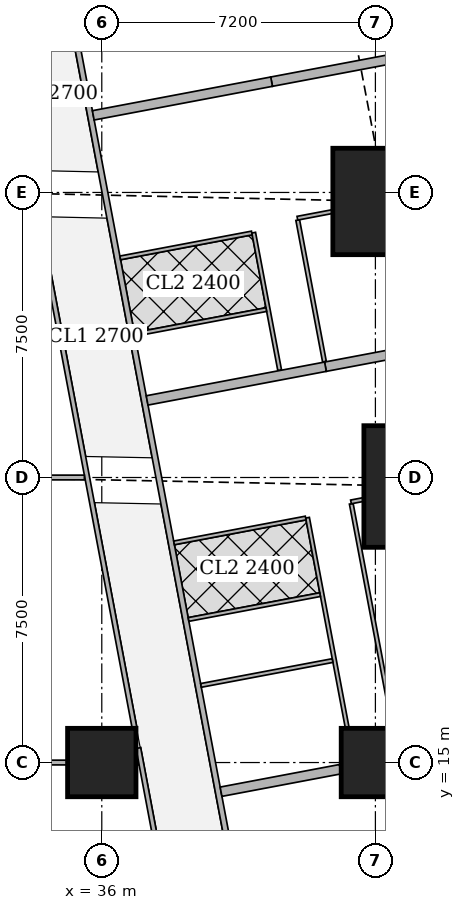
"""IFC4 building model, lengths in metres.
Left out: names, types, materials, properties, quantities, classifications, styles, units other than length and angle.
Written with IfcOpenShell. Run it as: python <this file> out.ifc"""

import sys

from ifc_helpers import new_model, si_unit, direction, frame, frame_2d, origin, origin_2d, place, context, subcontext, project, spatial, rectangle, extrude, element, fill, save


model = new_model("IFC4")
c1 = context("Model", 3, precision=1e-05, world=origin(), true_north=direction((0.0, 1.0)))
c2 = subcontext(c1, "Body", "Model", "MODEL_VIEW")
j1 = project(units=[si_unit("LENGTHUNIT", "METRE"), si_unit("PLANEANGLEUNIT", "RADIAN")], contexts=[c1])
p1 = place(None, origin())
s1 = spatial("IfcSite", under=j1, at=p1, CompositionType="ELEMENT")
p2 = place(p1, origin())
s2 = spatial("IfcBuilding", under=s1, at=p2, CompositionType="ELEMENT")
p3 = place(p2, frame((0.0, 0.0, 42.5)))
s3 = spatial("IfcBuildingStorey", under=s2, at=p3, CompositionType="ELEMENT", Elevation=42.5)
for number, where, z_axis, x_axis in (
    (1, (36.0, 15.0, 0.0), (0.0, 0.0, 1.0), (1.0, 0.0, 0.0)),
    (2, (43.2, 15.0, 0.0), (0.0, 0.0, 1.0), (1.0, 0.0, 0.0)),
):
    element("IfcColumn", number, at=place(p3, frame(where, z_axis=z_axis, x_axis=x_axis)), inside=s3, PredefinedType="COLUMN", context=c2, shape_type="SweptSolid", body=[
        extrude(rectangle(XDim=1.8, YDim=1.8, at=origin_2d()), origin(), (0.0, 0.0, 1.0), 3.75),
    ])
p4 = place(p3, frame((44.697, 22.263, 0.0), z_axis=(0.0, 0.0, 1.0), x_axis=(1.0, 0.0, 0.0)))
e3 = element("IfcColumn", 3, at=p4, inside=s3, PredefinedType="COLUMN", context=c2, shape_type="SweptSolid", body=[
    extrude(rectangle(XDim=3.6, YDim=3.2, at=origin_2d()), origin(), (0.0, 0.0, 1.0), 3.75),
])
p5 = place(p3, frame((43.48, 29.763, 0.0), z_axis=(0.0, 0.0, 1.0), x_axis=(1.0, 0.0, 0.0)))
e4 = element("IfcColumn", 4, at=p5, inside=s3, PredefinedType="COLUMN", context=c2, shape_type="SweptSolid", body=[
    extrude(rectangle(XDim=2.8, YDim=2.8, at=origin_2d()), origin(), (0.0, 0.0, 1.0), 3.75),
])
p6 = place(p3, frame((50.653, 2.703, 0.0), z_axis=(0.0, 0.0, 1.0), x_axis=(-0.185612026696, 0.982623109613, 0.0)))
e5 = element("IfcWall", 5, at=p6, inside=s3, PredefinedType="SOLIDWALL", context=c2, shape_type="SweptSolid", body=[
    extrude(rectangle(XDim=41.393, YDim=0.2, at=frame_2d((20.697, 0.0))), origin(), (0.0, 0.0, 1.0), 3.5),
])
p7 = place(p6, frame((1.633, 0.0, 0.9)))
e6 = element("IfcOpeningElement", 6, at=p7, cuts=e5, PredefinedType="OPENING", context=c2, shape_type="SweptSolid", body=[
    extrude(rectangle(XDim=1.8, YDim=1.5, at=frame_2d((0.9, 0.75))), frame((0.0, 0.11, 0.0), z_axis=(0.0, -1.0, 0.0), x_axis=(1.0, 0.0, 0.0)), (0.0, 0.0, 1.0), 0.22),
])
p8 = place(p6, frame((6.032, 0.0, 0.9)))
e7 = element("IfcOpeningElement", 7, at=p8, cuts=e5, PredefinedType="OPENING", context=c2, shape_type="SweptSolid", body=[
    extrude(rectangle(XDim=1.8, YDim=1.5, at=frame_2d((0.9, 0.75))), frame((0.0, 0.11, 0.0), z_axis=(0.0, -1.0, 0.0), x_axis=(1.0, 0.0, 0.0)), (0.0, 0.0, 1.0), 0.22),
])
p9 = place(p6, frame((9.848, 0.0, 0.9)))
e8 = element("IfcOpeningElement", 8, at=p9, cuts=e5, PredefinedType="OPENING", context=c2, shape_type="SweptSolid", body=[
    extrude(rectangle(XDim=1.8, YDim=1.5, at=frame_2d((0.9, 0.75))), frame((0.0, 0.11, 0.0), z_axis=(0.0, -1.0, 0.0), x_axis=(1.0, 0.0, 0.0)), (0.0, 0.0, 1.0), 0.22),
])
p10 = place(p6, frame((17.481, 0.0, 0.9)))
e9 = element("IfcOpeningElement", 9, at=p10, cuts=e5, PredefinedType="OPENING", context=c2, shape_type="SweptSolid", body=[
    extrude(rectangle(XDim=1.8, YDim=1.5, at=frame_2d((0.9, 0.75))), frame((0.0, 0.11, 0.0), z_axis=(0.0, -1.0, 0.0), x_axis=(1.0, 0.0, 0.0)), (0.0, 0.0, 1.0), 0.22),
])
p11 = place(p6, frame((21.297, 0.0, 0.9)))
e10 = element("IfcOpeningElement", 10, at=p11, cuts=e5, PredefinedType="OPENING", context=c2, shape_type="SweptSolid", body=[
    extrude(rectangle(XDim=1.8, YDim=1.5, at=frame_2d((0.9, 0.75))), frame((0.0, 0.11, 0.0), z_axis=(0.0, -1.0, 0.0), x_axis=(1.0, 0.0, 0.0)), (0.0, 0.0, 1.0), 0.22),
])
p12 = place(p6, frame((25.113, 0.0, 0.9)))
e11 = element("IfcOpeningElement", 11, at=p12, cuts=e5, PredefinedType="OPENING", context=c2, shape_type="SweptSolid", body=[
    extrude(rectangle(XDim=1.8, YDim=1.5, at=frame_2d((0.9, 0.75))), frame((0.0, 0.11, 0.0), z_axis=(0.0, -1.0, 0.0), x_axis=(1.0, 0.0, 0.0)), (0.0, 0.0, 1.0), 0.22),
])
p13 = place(p6, frame((28.93, 0.0, 0.9)))
e12 = element("IfcOpeningElement", 12, at=p13, cuts=e5, PredefinedType="OPENING", context=c2, shape_type="SweptSolid", body=[
    extrude(rectangle(XDim=1.8, YDim=1.5, at=frame_2d((0.9, 0.75))), frame((0.0, 0.11, 0.0), z_axis=(0.0, -1.0, 0.0), x_axis=(1.0, 0.0, 0.0)), (0.0, 0.0, 1.0), 0.22),
])
p14 = place(p6, frame((32.746, 0.0, 0.9)))
e13 = element("IfcOpeningElement", 13, at=p14, cuts=e5, PredefinedType="OPENING", context=c2, shape_type="SweptSolid", body=[
    extrude(rectangle(XDim=1.8, YDim=1.5, at=frame_2d((0.9, 0.75))), frame((0.0, 0.11, 0.0), z_axis=(0.0, -1.0, 0.0), x_axis=(1.0, 0.0, 0.0)), (0.0, 0.0, 1.0), 0.22),
])
p15 = place(p6, frame((36.481, 0.0, 0.9)))
e14 = element("IfcOpeningElement", 14, at=p15, cuts=e5, PredefinedType="OPENING", context=c2, shape_type="SweptSolid", body=[
    extrude(rectangle(XDim=1.8, YDim=1.5, at=frame_2d((0.9, 0.75))), frame((0.0, 0.11, 0.0), z_axis=(0.0, -1.0, 0.0), x_axis=(1.0, 0.0, 0.0)), (0.0, 0.0, 1.0), 0.22),
])
p16 = place(p3, frame((33.68, 42.723, 0.0), z_axis=(0.0, 0.0, 1.0), x_axis=(0.185624129307, -0.98262082342, 0.0)))
e15 = element("IfcWall", 15, at=p16, inside=s3, PredefinedType="SOLIDWALL", context=c2, shape_type="SweptSolid", body=[
    extrude(rectangle(XDim=41.051, YDim=0.15, at=frame_2d((20.526, 0.0))), origin(), (0.0, 0.0, 1.0), 2.5),
])
p17 = place(p16, frame((7.73, 0.0, 0.0)))
e16 = element("IfcOpeningElement", 16, at=p17, cuts=e15, PredefinedType="OPENING", context=c2, shape_type="SweptSolid", body=[
    extrude(rectangle(XDim=1.0, YDim=2.1, at=frame_2d((0.5, 1.05))), frame((0.0, 0.085, 0.0), z_axis=(0.0, -1.0, 0.0), x_axis=(1.0, 0.0, 0.0)), (0.0, 0.0, 1.0), 0.17),
])
p18 = place(p16, frame((12.307, 0.0, 0.0)))
e17 = element("IfcOpeningElement", 17, at=p18, cuts=e15, PredefinedType="OPENING", context=c2, shape_type="SweptSolid", body=[
    extrude(rectangle(XDim=1.0, YDim=2.1, at=frame_2d((0.5, 1.05))), frame((0.0, 0.085, 0.0), z_axis=(0.0, -1.0, 0.0), x_axis=(1.0, 0.0, 0.0)), (0.0, 0.0, 1.0), 0.17),
])
p19 = place(p16, frame((19.938, 0.0, 0.0)))
e18 = element("IfcOpeningElement", 18, at=p19, cuts=e15, PredefinedType="OPENING", context=c2, shape_type="SweptSolid", body=[
    extrude(rectangle(XDim=1.0, YDim=2.1, at=frame_2d((0.5, 1.05))), frame((0.0, 0.085, 0.0), z_axis=(0.0, -1.0, 0.0), x_axis=(1.0, 0.0, 0.0)), (0.0, 0.0, 1.0), 0.17),
])
p20 = place(p16, frame((32.193, 0.0, 0.0)))
e19 = element("IfcOpeningElement", 19, at=p20, cuts=e15, PredefinedType="OPENING", context=c2, shape_type="SweptSolid", body=[
    extrude(rectangle(XDim=1.0, YDim=2.1, at=frame_2d((0.5, 1.05))), frame((0.0, 0.085, 0.0), z_axis=(0.0, -1.0, 0.0), x_axis=(1.0, 0.0, 0.0)), (0.0, 0.0, 1.0), 0.17),
])
p21 = place(p3, frame((41.156, 29.273, 0.0), z_axis=(0.0, 0.0, 1.0), x_axis=(0.185474762472, -0.982649028131, 0.0)))
e20 = element("IfcWall", 20, at=p21, inside=s3, PredefinedType="PARTITIONING", context=c2, shape_type="SweptSolid", body=[
    extrude(rectangle(XDim=3.79, YDim=0.1, at=frame_2d((1.895, 0.0))), origin(), (0.0, 0.0, 1.0), 2.5),
])
p22 = place(p21, frame((1.2, 0.0, 0.0)))
e21 = element("IfcOpeningElement", 21, at=p22, cuts=e20, PredefinedType="OPENING", context=c2, shape_type="SweptSolid", body=[
    extrude(rectangle(XDim=0.9, YDim=2.1, at=frame_2d((0.45, 1.05))), frame((0.0, 0.06, 0.0), z_axis=(0.0, -1.0, 0.0), x_axis=(1.0, 0.0, 0.0)), (0.0, 0.0, 1.0), 0.12),
])
p23 = place(p3, frame((39.997, 28.942, 0.0), z_axis=(0.0, 0.0, 1.0), x_axis=(0.185580474845, -0.982629069057, 0.0)))
e22 = element("IfcWall", 22, at=p23, inside=s3, PredefinedType="PARTITIONING", context=c2, shape_type="SweptSolid", body=[
    extrude(rectangle(XDim=3.685, YDim=0.1, at=frame_2d((1.842, 0.0))), origin(), (0.0, 0.0, 1.0), 3.5),
])
p24 = place(p23, frame((0.576, 0.0, 0.0)))
e23 = element("IfcOpeningElement", 23, at=p24, cuts=e22, PredefinedType="OPENING", context=c2, shape_type="SweptSolid", body=[
    extrude(rectangle(XDim=0.9, YDim=2.1, at=frame_2d((0.45, 1.05))), frame((0.0, 0.06, 0.0), z_axis=(0.0, -1.0, 0.0), x_axis=(1.0, 0.0, 0.0)), (0.0, 0.0, 1.0), 0.12),
])
p25 = place(p23, frame((2.483, 0.0, 0.0)))
e24 = element("IfcOpeningElement", 24, at=p25, cuts=e22, PredefinedType="OPENING", context=c2, shape_type="SweptSolid", body=[
    extrude(rectangle(XDim=0.9, YDim=2.1, at=frame_2d((0.45, 1.05))), frame((0.0, 0.06, 0.0), z_axis=(0.0, -1.0, 0.0), x_axis=(1.0, 0.0, 0.0)), (0.0, 0.0, 1.0), 0.12),
])
p26 = place(p3, frame((42.07, 29.497, 0.0), z_axis=(0.0, 0.0, 1.0), x_axis=(-0.982490624992, -0.186312028067, 0.0)))
e25 = element("IfcWall", 25, at=p26, inside=s3, PredefinedType="PARTITIONING", context=c2, shape_type="SweptSolid", body=[
    extrude(rectangle(XDim=0.939, YDim=0.1, at=frame_2d((0.47, 0.0))), origin(), (0.0, 0.0, 1.0), 2.5),
])
p27 = place(p3, frame((39.948, 28.933, 0.0), z_axis=(0.0, 0.0, 1.0), x_axis=(-0.982576058723, -0.185860939478, 0.0)))
e26 = element("IfcWall", 26, at=p27, inside=s3, PredefinedType="PARTITIONING", context=c2, shape_type="SweptSolid", body=[
    extrude(rectangle(XDim=3.524, YDim=0.1, at=frame_2d((1.762, 0.0))), origin(), (0.0, 0.0, 1.0), 3.5),
])
p28 = place(p3, frame((40.329, 26.918, 0.0), z_axis=(0.0, 0.0, 1.0), x_axis=(-0.982638553676, -0.185530247748, 0.0)))
e27 = element("IfcWall", 27, at=p28, inside=s3, PredefinedType="PARTITIONING", context=c2, shape_type="SweptSolid", body=[
    extrude(rectangle(XDim=3.525, YDim=0.1, at=frame_2d((1.763, 0.0))), origin(), (0.0, 0.0, 1.0), 3.5),
])
p29 = place(p3, frame((44.693, 33.713, 0.0), z_axis=(0.0, 0.0, 1.0), x_axis=(-0.982633535512, -0.185556823879, 0.0)))
e28 = element("IfcWall", 28, at=p29, inside=s3, PredefinedType="SOLIDWALL", context=c2, shape_type="SweptSolid", body=[
    extrude(rectangle(XDim=4.3, YDim=0.25, at=frame_2d((2.15, 0.0))), origin(), (0.0, 0.0, 1.0), 2.05),
])
p30 = place(p3, frame((40.468, 32.915, 0.0), z_axis=(0.0, 0.0, 1.0), x_axis=(-0.982635807605, -0.185544791394, 0.0)))
e29 = element("IfcWall", 29, at=p30, inside=s3, PredefinedType="SOLIDWALL", context=c2, shape_type="SweptSolid", body=[
    extrude(rectangle(XDim=4.775, YDim=0.25, at=frame_2d((2.388, 0.0))), origin(), (0.0, 0.0, 1.0), 3.5),
])
p31 = place(p3, frame((42.565, 21.809, 0.0), z_axis=(0.0, 0.0, 1.0), x_axis=(0.185719768524, -0.982602751665, 0.0)))
e30 = element("IfcWall", 30, at=p31, inside=s3, PredefinedType="PARTITIONING", context=c2, shape_type="SweptSolid", body=[
    extrude(rectangle(XDim=6.004, YDim=0.1, at=frame_2d((3.002, 0.0))), origin(), (0.0, 0.0, 1.0), 2.5),
])
p32 = place(p31, frame((1.45, 0.0, 0.0)))
e31 = element("IfcOpeningElement", 31, at=p32, cuts=e30, PredefinedType="OPENING", context=c2, shape_type="SweptSolid", body=[
    extrude(rectangle(XDim=0.9, YDim=2.1, at=frame_2d((0.45, 1.05))), frame((0.0, 0.06, 0.0), z_axis=(0.0, -1.0, 0.0), x_axis=(1.0, 0.0, 0.0)), (0.0, 0.0, 1.0), 0.12),
])
p33 = place(p3, frame((41.414, 21.442, 0.0), z_axis=(0.0, 0.0, 1.0), x_axis=(0.185605379031, -0.982624365297, 0.0)))
e32 = element("IfcWall", 32, at=p33, inside=s3, PredefinedType="PARTITIONING", context=c2, shape_type="SweptSolid", body=[
    extrude(rectangle(XDim=5.63, YDim=0.1, at=frame_2d((2.815, 0.0))), origin(), (0.0, 0.0, 1.0), 3.5),
])
p34 = place(p33, frame((0.575, 0.0, 0.0)))
e33 = element("IfcOpeningElement", 33, at=p34, cuts=e32, PredefinedType="OPENING", context=c2, shape_type="SweptSolid", body=[
    extrude(rectangle(XDim=0.9, YDim=2.1, at=frame_2d((0.45, 1.05))), frame((0.0, 0.06, 0.0), z_axis=(0.0, -1.0, 0.0), x_axis=(1.0, 0.0, 0.0)), (0.0, 0.0, 1.0), 0.12),
])
p35 = place(p33, frame((4.58, 0.0, 0.0)))
e34 = element("IfcOpeningElement", 34, at=p35, cuts=e32, PredefinedType="OPENING", context=c2, shape_type="SweptSolid", body=[
    extrude(rectangle(XDim=0.9, YDim=2.1, at=frame_2d((0.45, 1.05))), frame((0.0, 0.06, 0.0), z_axis=(0.0, -1.0, 0.0), x_axis=(1.0, 0.0, 0.0)), (0.0, 0.0, 1.0), 0.12),
])
p36 = place(p33, frame((2.483, 0.0, 0.0)))
e35 = element("IfcOpeningElement", 35, at=p36, cuts=e32, PredefinedType="OPENING", context=c2, shape_type="SweptSolid", body=[
    extrude(rectangle(XDim=0.9, YDim=2.1, at=frame_2d((0.45, 1.05))), frame((0.0, 0.06, 0.0), z_axis=(0.0, -1.0, 0.0), x_axis=(1.0, 0.0, 0.0)), (0.0, 0.0, 1.0), 0.12),
])
p37 = place(p3, frame((42.887, 21.921, 0.0), z_axis=(0.0, 0.0, 1.0), x_axis=(-0.982274918032, -0.187445953293, 0.0)))
e36 = element("IfcWall", 36, at=p37, inside=s3, PredefinedType="PARTITIONING", context=c2, shape_type="SweptSolid", body=[
    extrude(rectangle(XDim=0.336, YDim=0.1, at=frame_2d((0.168, 0.0))), origin(), (0.0, 0.0, 1.0), 2.5),
])
p38 = place(p3, frame((41.365, 21.433, 0.0), z_axis=(0.0, 0.0, 1.0), x_axis=(-0.982638553676, -0.185530247748, 0.0)))
e37 = element("IfcWall", 37, at=p38, inside=s3, PredefinedType="PARTITIONING", context=c2, shape_type="SweptSolid", body=[
    extrude(rectangle(XDim=3.525, YDim=0.1, at=frame_2d((1.763, 0.0))), origin(), (0.0, 0.0, 1.0), 3.5),
])
p39 = place(p3, frame((42.073, 17.683, 0.0), z_axis=(0.0, 0.0, 1.0), x_axis=(-0.982626628545, -0.185593396635, 0.0)))
e38 = element("IfcWall", 38, at=p39, inside=s3, PredefinedType="PARTITIONING", context=c2, shape_type="SweptSolid", body=[
    extrude(rectangle(XDim=3.524, YDim=0.1, at=frame_2d((1.762, 0.0))), origin(), (0.0, 0.0, 1.0), 3.5),
])
p40 = place(p3, frame((41.745, 19.418, 0.0), z_axis=(0.0, 0.0, 1.0), x_axis=(-0.982629014545, -0.18558076348, 0.0)))
e39 = element("IfcWall", 39, at=p40, inside=s3, PredefinedType="PARTITIONING", context=c2, shape_type="SweptSolid", body=[
    extrude(rectangle(XDim=3.524, YDim=0.1, at=frame_2d((1.762, 0.0))), origin(), (0.0, 0.0, 1.0), 3.5),
])
p41 = place(p3, frame((46.11, 26.213, 0.0), z_axis=(0.0, 0.0, 1.0), x_axis=(-0.982633535512, -0.185556823879, 0.0)))
e40 = element("IfcWall", 40, at=p41, inside=s3, PredefinedType="SOLIDWALL", context=c2, shape_type="SweptSolid", body=[
    extrude(rectangle(XDim=4.3, YDim=0.25, at=frame_2d((2.15, 0.0))), origin(), (0.0, 0.0, 1.0), 2.05),
])
p42 = place(p3, frame((41.885, 25.415, 0.0), z_axis=(0.0, 0.0, 1.0), x_axis=(-0.982596737686, -0.185751584349, 0.0)))
e41 = element("IfcWall", 41, at=p42, inside=s3, PredefinedType="SOLIDWALL", context=c2, shape_type="SweptSolid", body=[
    extrude(rectangle(XDim=4.775, YDim=0.25, at=frame_2d((2.387, 0.0))), origin(), (0.0, 0.0, 1.0), 3.5),
])
p43 = place(p3, frame((42.276, 14.825, 0.0), z_axis=(0.0, 0.0, 1.0), x_axis=(-0.982607211054, -0.185696173318, 0.0)))
e42 = element("IfcWall", 42, at=p43, inside=s3, PredefinedType="SOLIDWALL", context=c2, shape_type="SweptSolid", body=[
    extrude(rectangle(XDim=3.194, YDim=0.25, at=frame_2d((1.597, 0.0))), origin(), (0.0, 0.0, 1.0), 3.5),
])
p44 = place(p3, frame((37.9, 10.413, 0.0), z_axis=(0.0, 0.0, 1.0), x_axis=(-0.185527510388, 0.982639070508, 0.0)))
e43 = element("IfcWall", 43, at=p44, inside=s3, PredefinedType="PARTITIONING", context=c2, shape_type="SweptSolid", body=[
    extrude(rectangle(XDim=5.056, YDim=0.125, at=frame_2d((2.528, 0.0))), origin(), (0.0, 0.0, 1.0), 3.5),
])
p45 = place(p44, frame((0.708, 0.0, 0.0)))
e44 = element("IfcOpeningElement", 44, at=p45, cuts=e43, PredefinedType="OPENING", context=c2, shape_type="SweptSolid", body=[
    extrude(rectangle(XDim=1.0, YDim=2.1, at=frame_2d((0.5, 1.05))), frame((0.0, 0.073, 0.0), z_axis=(0.0, -1.0, 0.0), x_axis=(1.0, 0.0, 0.0)), (0.0, 0.0, 1.0), 0.145),
])
p46 = place(p3, frame((36.861, 15.913, 0.0), z_axis=(0.0, 0.0, 1.0), x_axis=(-0.185588307143, 0.982627589808, 0.0)))
e45 = element("IfcWall", 45, at=p46, inside=s3, PredefinedType="PARTITIONING", context=c2, shape_type="SweptSolid", body=[
    extrude(rectangle(XDim=19.005, YDim=0.125, at=frame_2d((9.502, 0.0))), origin(), (0.0, 0.0, 1.0), 2.5),
])
p47 = place(p46, frame((0.25, 0.0, 0.0)))
e46 = element("IfcOpeningElement", 46, at=p47, cuts=e45, PredefinedType="OPENING", context=c2, shape_type="SweptSolid", body=[
    extrude(rectangle(XDim=1.0, YDim=2.1, at=frame_2d((0.5, 1.05))), frame((0.0, 0.073, 0.0), z_axis=(0.0, -1.0, 0.0), x_axis=(1.0, 0.0, 0.0)), (0.0, 0.0, 1.0), 0.145),
])
p48 = place(p46, frame((7.527, 0.0, 0.0)))
e47 = element("IfcOpeningElement", 47, at=p48, cuts=e45, PredefinedType="OPENING", context=c2, shape_type="SweptSolid", body=[
    extrude(rectangle(XDim=1.0, YDim=2.1, at=frame_2d((0.5, 1.05))), frame((0.0, 0.073, 0.0), z_axis=(0.0, -1.0, 0.0), x_axis=(1.0, 0.0, 0.0)), (0.0, 0.0, 1.0), 0.145),
])
p49 = place(p46, frame((15.5, 0.0, 0.0)))
e48 = element("IfcOpeningElement", 48, at=p49, cuts=e45, PredefinedType="OPENING", context=c2, shape_type="SweptSolid", body=[
    extrude(rectangle(XDim=1.0, YDim=2.1, at=frame_2d((0.5, 1.05))), frame((0.0, 0.073, 0.0), z_axis=(0.0, -1.0, 0.0), x_axis=(1.0, 0.0, 0.0)), (0.0, 0.0, 1.0), 0.145),
])
p50 = place(p3, frame((29.25, 15.0, 0.0), z_axis=(0.0, 0.0, 1.0), x_axis=(1.0, 0.0, 0.0)))
e49 = element("IfcWall", 49, at=p50, inside=s3, PredefinedType="PARTITIONING", context=c2, shape_type="SweptSolid", body=[
    extrude(rectangle(XDim=5.849, YDim=0.125, at=frame_2d((2.925, 0.0))), origin(), (0.0, 0.0, 1.0), 3.5),
])
p51 = place(p3, frame((36.901, 15.0, 0.0), z_axis=(0.0, 0.0, 1.0), x_axis=(1.0, 0.0, 0.0)))
e50 = element("IfcWall", 50, at=p51, inside=s3, PredefinedType="PARTITIONING", context=c2, shape_type="SweptSolid", body=[
    extrude(rectangle(XDim=0.057, YDim=0.125, at=frame_2d((0.029, 0.0))), origin(), (0.0, 0.0, 1.0), 3.5),
])
p52 = place(p3, frame((33.901, 22.5, 0.0), z_axis=(0.0, 0.0, 1.0), x_axis=(1.0, 0.0, 0.0)))
e51 = element("IfcWall", 51, at=p52, inside=s3, PredefinedType="PARTITIONING", context=c2, shape_type="SweptSolid", body=[
    extrude(rectangle(XDim=1.641, YDim=0.125, at=frame_2d((0.821, 0.0))), origin(), (0.0, 0.0, 1.0), 2.5),
])
p53 = place(p22, origin())
e52 = element("IfcDoor", 52, at=p53, inside=s3, OperationType="SINGLE_SWING_LEFT", PredefinedType="DOOR", context=c2, shape_type="SweptSolid", body=[
    extrude(rectangle(XDim=0.9, YDim=2.1, at=frame_2d((0.45, 1.05))), frame((0.0, 0.025, 0.0), z_axis=(0.0, -1.0, 0.0), x_axis=(1.0, 0.0, 0.0)), (0.0, 0.0, 1.0), 0.05),
])
fill(e21, e52)
p54 = place(p24, origin())
e53 = element("IfcDoor", 53, at=p54, inside=s3, OperationType="SINGLE_SWING_RIGHT", PredefinedType="DOOR", context=c2, shape_type="SweptSolid", body=[
    extrude(rectangle(XDim=0.9, YDim=2.1, at=frame_2d((0.45, 1.05))), frame((0.0, 0.025, 0.0), z_axis=(0.0, -1.0, 0.0), x_axis=(1.0, 0.0, 0.0)), (0.0, 0.0, 1.0), 0.05),
])
fill(e23, e53)
p55 = place(p25, origin())
e54 = element("IfcDoor", 54, at=p55, inside=s3, OperationType="SINGLE_SWING_LEFT", PredefinedType="DOOR", context=c2, shape_type="SweptSolid", body=[
    extrude(rectangle(XDim=0.9, YDim=2.1, at=frame_2d((0.45, 1.05))), frame((0.0, 0.025, 0.0), z_axis=(0.0, -1.0, 0.0), x_axis=(1.0, 0.0, 0.0)), (0.0, 0.0, 1.0), 0.05),
])
fill(e24, e54)
p56 = place(p18, origin())
e55 = element("IfcDoor", 55, at=p56, inside=s3, OperationType="SINGLE_SWING_RIGHT", PredefinedType="DOOR", context=c2, shape_type="SweptSolid", body=[
    extrude(rectangle(XDim=1.0, YDim=2.1, at=frame_2d((0.5, 1.05))), frame((0.0, 0.025, 0.0), z_axis=(0.0, -1.0, 0.0), x_axis=(1.0, 0.0, 0.0)), (0.0, 0.0, 1.0), 0.05),
])
fill(e17, e55)
p57 = place(p32, origin())
e56 = element("IfcDoor", 56, at=p57, inside=s3, OperationType="SINGLE_SWING_RIGHT", PredefinedType="DOOR", context=c2, shape_type="SweptSolid", body=[
    extrude(rectangle(XDim=0.9, YDim=2.1, at=frame_2d((0.45, 1.05))), frame((0.0, 0.025, 0.0), z_axis=(0.0, -1.0, 0.0), x_axis=(1.0, 0.0, 0.0)), (0.0, 0.0, 1.0), 0.05),
])
fill(e31, e56)
p58 = place(p34, origin())
e57 = element("IfcDoor", 57, at=p58, inside=s3, OperationType="SINGLE_SWING_RIGHT", PredefinedType="DOOR", context=c2, shape_type="SweptSolid", body=[
    extrude(rectangle(XDim=0.9, YDim=2.1, at=frame_2d((0.45, 1.05))), frame((0.0, 0.025, 0.0), z_axis=(0.0, -1.0, 0.0), x_axis=(1.0, 0.0, 0.0)), (0.0, 0.0, 1.0), 0.05),
])
fill(e33, e57)
p59 = place(p35, origin())
e58 = element("IfcDoor", 58, at=p59, inside=s3, OperationType="SINGLE_SWING_LEFT", PredefinedType="DOOR", context=c2, shape_type="SweptSolid", body=[
    extrude(rectangle(XDim=0.9, YDim=2.1, at=frame_2d((0.45, 1.05))), frame((0.0, 0.025, 0.0), z_axis=(0.0, -1.0, 0.0), x_axis=(1.0, 0.0, 0.0)), (0.0, 0.0, 1.0), 0.05),
])
fill(e34, e58)
p60 = place(p36, origin())
e59 = element("IfcDoor", 59, at=p60, inside=s3, OperationType="SINGLE_SWING_LEFT", PredefinedType="DOOR", context=c2, shape_type="SweptSolid", body=[
    extrude(rectangle(XDim=0.9, YDim=2.1, at=frame_2d((0.45, 1.05))), frame((0.0, 0.025, 0.0), z_axis=(0.0, -1.0, 0.0), x_axis=(1.0, 0.0, 0.0)), (0.0, 0.0, 1.0), 0.05),
])
fill(e35, e59)
p61 = place(p19, origin())
e60 = element("IfcDoor", 60, at=p61, inside=s3, OperationType="SINGLE_SWING_LEFT", PredefinedType="DOOR", context=c2, shape_type="SweptSolid", body=[
    extrude(rectangle(XDim=1.0, YDim=2.1, at=frame_2d((0.5, 1.05))), frame((0.0, 0.025, 0.0), z_axis=(0.0, -1.0, 0.0), x_axis=(1.0, 0.0, 0.0)), (0.0, 0.0, 1.0), 0.05),
])
fill(e18, e60)
p62 = place(p47, origin())
e61 = element("IfcDoor", 61, at=p62, inside=s3, OperationType="SINGLE_SWING_LEFT", PredefinedType="DOOR", context=c2, shape_type="SweptSolid", body=[
    extrude(rectangle(XDim=1.0, YDim=2.1, at=frame_2d((0.5, 1.05))), frame((0.0, 0.025, 0.0), z_axis=(0.0, -1.0, 0.0), x_axis=(1.0, 0.0, 0.0)), (0.0, 0.0, 1.0), 0.05),
])
fill(e46, e61)
p63 = place(p48, origin())
e62 = element("IfcDoor", 62, at=p63, inside=s3, OperationType="SINGLE_SWING_LEFT", PredefinedType="DOOR", context=c2, shape_type="SweptSolid", body=[
    extrude(rectangle(XDim=1.0, YDim=2.1, at=frame_2d((0.5, 1.05))), frame((0.0, 0.025, 0.0), z_axis=(0.0, -1.0, 0.0), x_axis=(1.0, 0.0, 0.0)), (0.0, 0.0, 1.0), 0.05),
])
fill(e47, e62)
save(model, sys.argv[1])
